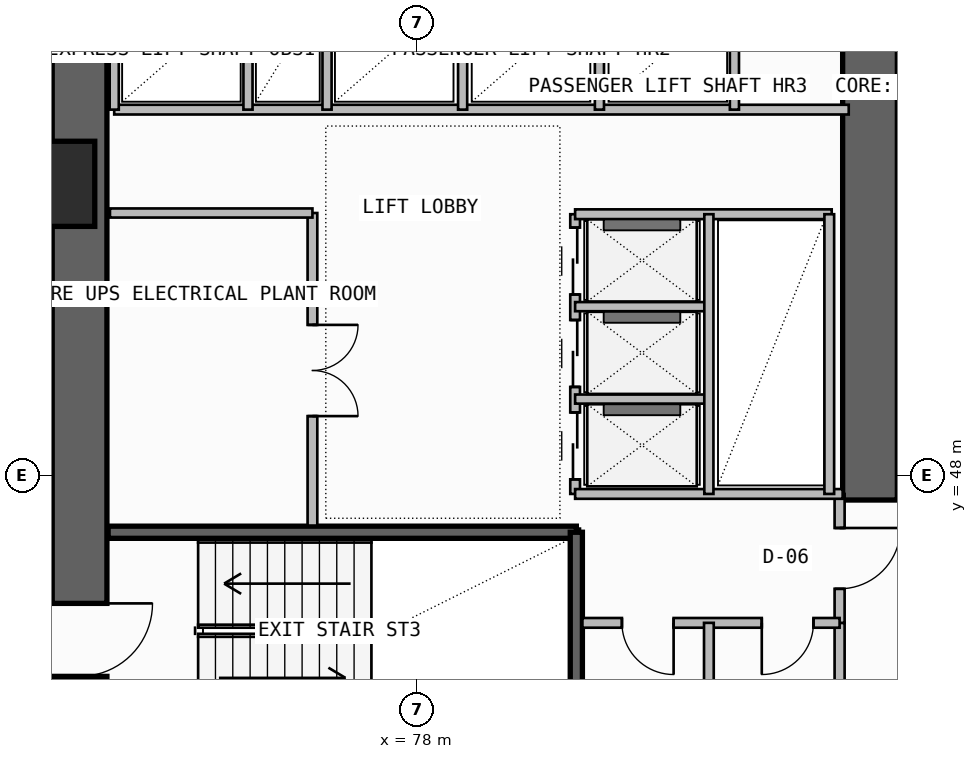
"""IFC4 building model, lengths in metres.
Left out: names, types, materials, properties, quantities, classifications, styles, units other than length and angle.
Written with IfcOpenShell. Run it as: python <this file> out.ifc"""

import sys

from ifc_helpers import new_model, si_unit, direction, frame, frame_2d, origin, origin_2d, place, context, subcontext, project, spatial, rectangle, extrude, element, fill, save


model = new_model("IFC4")
c1 = context("Model", 3, precision=1e-05, world=origin(), true_north=direction((0.0, 1.0)))
c2 = subcontext(c1, "Body", "Model", "MODEL_VIEW")
j1 = project(units=[si_unit("LENGTHUNIT", "METRE"), si_unit("PLANEANGLEUNIT", "RADIAN")], contexts=[c1])
p1 = place(None, origin())
s1 = spatial("IfcSite", under=j1, at=p1, CompositionType="ELEMENT")
p2 = place(p1, origin())
s2 = spatial("IfcBuilding", under=s1, at=p2, CompositionType="ELEMENT")
p3 = place(p2, frame((0.0, 0.0, 143.1)))
s3 = spatial("IfcBuildingStorey", under=s2, at=p3, CompositionType="ELEMENT", Elevation=143.1)
p4 = place(p3, frame((72.45, 43.35, -0.26), z_axis=(0.0, 0.0, 1.0), x_axis=(0.0, 1.0, 0.0)))
e1 = element("IfcWall", 1, at=p4, inside=s3, PredefinedType="SHEAR", context=c2, shape_type="SweptSolid", body=[
    extrude(rectangle(XDim=12.7, YDim=0.9, at=frame_2d((6.35, 0.0))), origin(), (0.0, 0.0, 1.0), 3.6),
])
p5 = place(p4, frame((1.35, 0.0, 0.26)))
e2 = element("IfcOpeningElement", 2, at=p5, cuts=e1, PredefinedType="OPENING", context=c2, shape_type="SweptSolid", body=[
    extrude(rectangle(XDim=1.2, YDim=2.2, at=frame_2d((0.6, 1.1))), frame((0.0, 0.46, 0.0), z_axis=(0.0, -1.0, 0.0), x_axis=(1.0, 0.0, 0.0)), (0.0, 0.0, 1.0), 0.92),
])
p6 = place(p3, frame((85.45, 47.6, -0.26), z_axis=(0.0, 0.0, 1.0), x_axis=(0.0, 1.0, 0.0)))
e3 = element("IfcWall", 3, at=p6, inside=s3, PredefinedType="SHEAR", context=c2, shape_type="SweptSolid", body=[
    extrude(rectangle(XDim=8.45, YDim=0.9, at=frame_2d((4.225, 0.0))), origin(), (0.0, 0.0, 1.0), 3.6),
])
p7 = place(p3, frame((72.0, 52.8, 0.0), z_axis=(0.0, 0.0, 1.0), x_axis=(1.0, 0.0, 0.0)))
e4 = element("IfcColumn", 4, at=p7, inside=s3, PredefinedType="COLUMN", context=c2, shape_type="SweptSolid", body=[
    extrude(rectangle(XDim=1.4, YDim=1.4, at=origin_2d()), origin(), (0.0, 0.0, 1.0), 3.6),
])
p8 = place(p3, frame((72.92, 47.07, -0.26), z_axis=(0.0, 0.0, 1.0), x_axis=(1.0, 0.0, 0.0)))
e5 = element("IfcWall", 5, at=p8, inside=s3, PredefinedType="SOLIDWALL", context=c2, shape_type="SweptSolid", body=[
    extrude(rectangle(XDim=7.7, YDim=0.2, at=frame_2d((3.85, 0.0))), origin(), (0.0, 0.0, 1.0), 3.6),
])
p9 = place(p3, frame((80.62, 43.83, -0.26), z_axis=(0.0, 0.0, 1.0), x_axis=(0.0, 1.0, 0.0)))
e6 = element("IfcWall", 6, at=p9, inside=s3, PredefinedType="SOLIDWALL", context=c2, shape_type="SweptSolid", body=[
    extrude(rectangle(XDim=3.24, YDim=0.2, at=frame_2d((1.62, 0.0))), origin(), (0.0, 0.0, 1.0), 3.6),
])
p10 = place(p3, frame((84.95, 43.68, 0.0), z_axis=(0.0, 0.0, 1.0), x_axis=(0.0, 1.0, 0.0)))
e7 = element("IfcWall", 7, at=p10, inside=s3, PredefinedType="PLUMBINGWALL", context=c2, shape_type="SweptSolid", body=[
    extrude(rectangle(XDim=1.9, YDim=0.165, at=frame_2d((0.95, 0.0))), origin(), (0.0, 0.0, 1.0), 3.34),
])
p11 = place(p3, frame((84.95, 45.58, 0.0), z_axis=(0.0, 0.0, 1.0), x_axis=(0.0, 1.0, 0.0)))
e8 = element("IfcWall", 8, at=p11, inside=s3, PredefinedType="PARTITIONING", context=c2, shape_type="SweptSolid", body=[
    extrude(rectangle(XDim=2.12, YDim=0.165, at=frame_2d((1.06, 0.0))), origin(), (0.0, 0.0, 1.0), 3.34),
])
p12 = place(p11, frame((0.56, 0.0, 0.0)))
e9 = element("IfcOpeningElement", 9, at=p12, cuts=e8, PredefinedType="OPENING", context=c2, shape_type="SweptSolid", body=[
    extrude(rectangle(XDim=1.0, YDim=2.2, at=frame_2d((0.5, 1.1))), frame((0.0, 0.093, 0.0), z_axis=(0.0, -1.0, 0.0), x_axis=(1.0, 0.0, 0.0)), (0.0, 0.0, 1.0), 0.185),
])
p13 = place(p3, frame((80.72, 45.58, 0.0), z_axis=(0.0, 0.0, 1.0), x_axis=(1.0, 0.0, 0.0)))
e10 = element("IfcWall", 10, at=p13, inside=s3, PredefinedType="PLUMBINGWALL", context=c2, shape_type="SweptSolid", body=[
    extrude(rectangle(XDim=4.23, YDim=0.16, at=frame_2d((2.115, 0.0))), origin(), (0.0, 0.0, 1.0), 3.34),
])
p14 = place(p13, frame((0.65, 0.0, 0.0)))
e11 = element("IfcOpeningElement", 11, at=p14, cuts=e10, PredefinedType="OPENING", context=c2, shape_type="SweptSolid", body=[
    extrude(rectangle(XDim=0.85, YDim=2.05, at=frame_2d((0.425, 1.025))), frame((0.0, 0.09, 0.0), z_axis=(0.0, -1.0, 0.0), x_axis=(1.0, 0.0, 0.0)), (0.0, 0.0, 1.0), 0.18),
])
p15 = place(p13, frame((2.95, 0.0, 0.0)))
e12 = element("IfcOpeningElement", 12, at=p15, cuts=e10, PredefinedType="OPENING", context=c2, shape_type="SweptSolid", body=[
    extrude(rectangle(XDim=0.85, YDim=2.05, at=frame_2d((0.425, 1.025))), frame((0.0, 0.09, 0.0), z_axis=(0.0, -1.0, 0.0), x_axis=(1.0, 0.0, 0.0)), (0.0, 0.0, 1.0), 0.18),
])
p16 = place(p3, frame((82.8, 43.68, 0.0), z_axis=(0.0, 0.0, 1.0), x_axis=(0.0, 1.0, 0.0)))
e13 = element("IfcWall", 13, at=p16, inside=s3, PredefinedType="PLUMBINGWALL", context=c2, shape_type="SweptSolid", body=[
    extrude(rectangle(XDim=1.9, YDim=0.16, at=frame_2d((0.95, 0.0))), origin(), (0.0, 0.0, 1.0), 3.34),
])
p17 = place(p3, frame((76.28, 47.18, 0.0), z_axis=(0.0, 0.0, 1.0), x_axis=(0.0, 1.0, 0.0)))
e14 = element("IfcWall", 14, at=p17, inside=s3, PredefinedType="SOLIDWALL", context=c2, shape_type="SweptSolid", body=[
    extrude(rectangle(XDim=5.14, YDim=0.16, at=frame_2d((2.57, 0.0))), origin(), (0.0, 0.0, 1.0), 3.34),
])
p18 = place(p17, frame((1.8, 0.0, 0.0)))
e15 = element("IfcOpeningElement", 15, at=p18, cuts=e14, PredefinedType="OPENING", context=c2, shape_type="SweptSolid", body=[
    extrude(rectangle(XDim=1.5, YDim=2.25, at=frame_2d((0.75, 1.125))), frame((0.0, 0.09, 0.0), z_axis=(0.0, -1.0, 0.0), x_axis=(1.0, 0.0, 0.0)), (0.0, 0.0, 1.0), 0.18),
])
p19 = place(p3, frame((72.95, 52.32, 0.0), z_axis=(0.0, 0.0, 1.0), x_axis=(1.0, 0.0, 0.0)))
e16 = element("IfcWall", 16, at=p19, inside=s3, PredefinedType="SOLIDWALL", context=c2, shape_type="SweptSolid", body=[
    extrude(rectangle(XDim=3.33, YDim=0.15, at=frame_2d((1.665, 0.0))), origin(), (0.0, 0.0, 1.0), 3.34),
])
p20 = place(p3, frame((80.6, 47.7, 0.0), z_axis=(0.0, 0.0, 1.0), x_axis=(0.0, 1.0, 0.0)))
e17 = element("IfcWall", 17, at=p20, inside=s3, PredefinedType="SOLIDWALL", context=c2, shape_type="SweptSolid", body=[
    extrude(rectangle(XDim=4.6, YDim=0.16, at=frame_2d((2.3, 0.0))), origin(), (0.0, 0.0, 1.0), 3.34),
])
p21 = place(p20, frame((0.24, 0.0, 0.0)))
e18 = element("IfcOpeningElement", 18, at=p21, cuts=e17, PredefinedType="OPENING", context=c2, shape_type="SweptSolid", body=[
    extrude(rectangle(XDim=1.1, YDim=2.25, at=frame_2d((0.55, 1.125))), frame((0.0, 0.09, 0.0), z_axis=(0.0, -1.0, 0.0), x_axis=(1.0, 0.0, 0.0)), (0.0, 0.0, 1.0), 0.18),
])
p22 = place(p20, frame((1.76, 0.0, 0.0)))
e19 = element("IfcOpeningElement", 19, at=p22, cuts=e17, PredefinedType="OPENING", context=c2, shape_type="SweptSolid", body=[
    extrude(rectangle(XDim=1.1, YDim=2.25, at=frame_2d((0.55, 1.125))), frame((0.0, 0.09, 0.0), z_axis=(0.0, -1.0, 0.0), x_axis=(1.0, 0.0, 0.0)), (0.0, 0.0, 1.0), 0.18),
])
p23 = place(p20, frame((3.28, 0.0, 0.0)))
e20 = element("IfcOpeningElement", 20, at=p23, cuts=e17, PredefinedType="OPENING", context=c2, shape_type="SweptSolid", body=[
    extrude(rectangle(XDim=1.1, YDim=2.25, at=frame_2d((0.55, 1.125))), frame((0.0, 0.09, 0.0), z_axis=(0.0, -1.0, 0.0), x_axis=(1.0, 0.0, 0.0)), (0.0, 0.0, 1.0), 0.18),
])
p24 = place(p3, frame((80.6, 47.7, 0.0), z_axis=(0.0, 0.0, 1.0), x_axis=(1.0, 0.0, 0.0)))
e21 = element("IfcWall", 21, at=p24, inside=s3, PredefinedType="SOLIDWALL", context=c2, shape_type="SweptSolid", body=[
    extrude(rectangle(XDim=4.4, YDim=0.16, at=frame_2d((2.2, 0.0))), origin(), (0.0, 0.0, 1.0), 3.34),
])
p25 = place(p3, frame((80.6, 52.3, 0.0), z_axis=(0.0, 0.0, 1.0), x_axis=(1.0, 0.0, 0.0)))
e22 = element("IfcWall", 22, at=p25, inside=s3, PredefinedType="SOLIDWALL", context=c2, shape_type="SweptSolid", body=[
    extrude(rectangle(XDim=4.22, YDim=0.16, at=frame_2d((2.11, 0.0))), origin(), (0.0, 0.0, 1.0), 3.34),
])
for number, where, z_axis, x_axis in (
    (23, (80.6, 49.26, 0.0), (0.0, 0.0, 1.0), (1.0, 0.0, 0.0)),
    (24, (80.6, 50.78, 0.0), (0.0, 0.0, 1.0), (1.0, 0.0, 0.0)),
):
    element("IfcWall", number, at=place(p3, frame(where, z_axis=z_axis, x_axis=x_axis)), inside=s3, PredefinedType="PLUMBINGWALL", context=c2, shape_type="SweptSolid", body=[
        extrude(rectangle(XDim=2.2, YDim=0.15, at=frame_2d((1.1, 0.0))), origin(), (0.0, 0.0, 1.0), 3.34),
    ])
p26 = place(p3, frame((82.8, 47.7, 0.0), z_axis=(0.0, 0.0, 1.0), x_axis=(0.0, 1.0, 0.0)))
e25 = element("IfcWall", 25, at=p26, inside=s3, PredefinedType="PLUMBINGWALL", context=c2, shape_type="SweptSolid", body=[
    extrude(rectangle(XDim=4.6, YDim=0.15, at=frame_2d((2.3, 0.0))), origin(), (0.0, 0.0, 1.0), 3.34),
])
p27 = place(p3, frame((84.78, 47.7, 0.0), z_axis=(0.0, 0.0, 1.0), x_axis=(0.0, 1.0, 0.0)))
e26 = element("IfcWall", 26, at=p27, inside=s3, PredefinedType="SOLIDWALL", context=c2, shape_type="SweptSolid", body=[
    extrude(rectangle(XDim=4.6, YDim=0.16, at=frame_2d((2.3, 0.0))), origin(), (0.0, 0.0, 1.0), 3.34),
])
p28 = place(p3, frame((73.02, 54.02, 0.0), z_axis=(0.0, 0.0, 1.0), x_axis=(1.0, 0.0, 0.0)))
e27 = element("IfcWall", 27, at=p28, inside=s3, PredefinedType="SOLIDWALL", context=c2, shape_type="SweptSolid", body=[
    extrude(rectangle(XDim=12.08, YDim=0.16, at=frame_2d((6.04, 0.0))), origin(), (0.0, 0.0, 1.0), 3.34),
])
p29 = place(p3, frame((73.02, 54.02, 0.0), z_axis=(0.0, 0.0, 1.0), x_axis=(0.0, 1.0, 0.0)))
e28 = element("IfcWall", 28, at=p29, inside=s3, PredefinedType="PLUMBINGWALL", context=c2, shape_type="SweptSolid", body=[
    extrude(rectangle(XDim=1.94, YDim=0.15, at=frame_2d((0.97, 0.0))), origin(), (0.0, 0.0, 1.0), 3.34),
])
p30 = place(p3, frame((76.52, 54.02, 0.0), z_axis=(0.0, 0.0, 1.0), x_axis=(0.0, 1.0, 0.0)))
e29 = element("IfcWall", 29, at=p30, inside=s3, PredefinedType="SOLIDWALL", context=c2, shape_type="SweptSolid", body=[
    extrude(rectangle(XDim=1.94, YDim=0.15, at=frame_2d((0.97, 0.0))), origin(), (0.0, 0.0, 1.0), 3.34),
])
p31 = place(p3, frame((75.22, 54.02, 0.0), z_axis=(0.0, 0.0, 1.0), x_axis=(0.0, 1.0, 0.0)))
e30 = element("IfcWall", 30, at=p31, inside=s3, PredefinedType="PLUMBINGWALL", context=c2, shape_type="SweptSolid", body=[
    extrude(rectangle(XDim=1.94, YDim=0.15, at=frame_2d((0.97, 0.0))), origin(), (0.0, 0.0, 1.0), 3.34),
])
for number, where, z_axis, x_axis in (
    (31, (78.75, 54.02, 0.0), (0.0, 0.0, 1.0), (0.0, 1.0, 0.0)),
    (32, (81.0, 54.02, 0.0), (0.0, 0.0, 1.0), (0.0, 1.0, 0.0)),
):
    element("IfcWall", number, at=place(p3, frame(where, z_axis=z_axis, x_axis=x_axis)), inside=s3, PredefinedType="PLUMBINGWALL", context=c2, shape_type="SweptSolid", body=[
        extrude(rectangle(XDim=1.96, YDim=0.15, at=frame_2d((0.98, 0.0))), origin(), (0.0, 0.0, 1.0), 3.34),
    ])
p32 = place(p3, frame((83.22, 54.02, 0.0), z_axis=(0.0, 0.0, 1.0), x_axis=(0.0, 1.0, 0.0)))
e33 = element("IfcWall", 33, at=p32, inside=s3, PredefinedType="SOLIDWALL", context=c2, shape_type="SweptSolid", body=[
    extrude(rectangle(XDim=1.96, YDim=0.15, at=frame_2d((0.98, 0.0))), origin(), (0.0, 0.0, 1.0), 3.34),
])
p33 = place(p5, frame((1.2, 0.0, 0.0), z_axis=(0.0, 0.0, 1.0), x_axis=(-1.0, 0.0, 0.0)))
e34 = element("IfcDoor", 34, at=p33, inside=s3, OperationType="SINGLE_SWING_LEFT", PredefinedType="USERDEFINED", context=c2, shape_type="SweptSolid", body=[
    extrude(rectangle(XDim=1.2, YDim=2.2, at=frame_2d((0.6, 1.1))), frame((0.0, 0.025, 0.0), z_axis=(0.0, -1.0, 0.0), x_axis=(1.0, 0.0, 0.0)), (0.0, 0.0, 1.0), 0.05),
])
fill(e2, e34)
p34 = place(p12, frame((1.0, 0.0, 0.0), z_axis=(0.0, 0.0, 1.0), x_axis=(-1.0, 0.0, 0.0)))
e35 = element("IfcDoor", 35, at=p34, inside=s3, OperationType="SINGLE_SWING_LEFT", PredefinedType="DOOR", context=c2, shape_type="SweptSolid", body=[
    extrude(rectangle(XDim=1.0, YDim=2.2, at=frame_2d((0.5, 1.1))), frame((0.0, 0.025, 0.0), z_axis=(0.0, -1.0, 0.0), x_axis=(1.0, 0.0, 0.0)), (0.0, 0.0, 1.0), 0.05),
])
fill(e9, e35)
p35 = place(p14, frame((0.85, 0.0, 0.0), z_axis=(0.0, 0.0, 1.0), x_axis=(-1.0, 0.0, 0.0)))
e36 = element("IfcDoor", 36, at=p35, inside=s3, OperationType="SINGLE_SWING_LEFT", PredefinedType="DOOR", context=c2, shape_type="SweptSolid", body=[
    extrude(rectangle(XDim=0.85, YDim=2.05, at=frame_2d((0.425, 1.025))), frame((0.0, 0.025, 0.0), z_axis=(0.0, -1.0, 0.0), x_axis=(1.0, 0.0, 0.0)), (0.0, 0.0, 1.0), 0.05),
])
fill(e11, e36)
p36 = place(p15, frame((0.85, 0.0, 0.0), z_axis=(0.0, 0.0, 1.0), x_axis=(-1.0, 0.0, 0.0)))
e37 = element("IfcDoor", 37, at=p36, inside=s3, OperationType="SINGLE_SWING_RIGHT", PredefinedType="DOOR", context=c2, shape_type="SweptSolid", body=[
    extrude(rectangle(XDim=0.85, YDim=2.05, at=frame_2d((0.425, 1.025))), frame((0.0, 0.025, 0.0), z_axis=(0.0, -1.0, 0.0), x_axis=(1.0, 0.0, 0.0)), (0.0, 0.0, 1.0), 0.05),
])
fill(e12, e37)
p37 = place(p18, frame((1.5, 0.0, 0.0), z_axis=(0.0, 0.0, 1.0), x_axis=(-1.0, 0.0, 0.0)))
e38 = element("IfcDoor", 38, at=p37, inside=s3, OperationType="DOUBLE_DOOR_SINGLE_SWING", PredefinedType="DOOR", context=c2, shape_type="SweptSolid", body=[
    extrude(rectangle(XDim=1.5, YDim=2.25, at=frame_2d((0.75, 1.125))), frame((0.0, 0.025, 0.0), z_axis=(0.0, -1.0, 0.0), x_axis=(1.0, 0.0, 0.0)), (0.0, 0.0, 1.0), 0.05),
])
fill(e15, e38)
p38 = place(p21, frame((1.1, 0.0, 0.0), z_axis=(0.0, 0.0, 1.0), x_axis=(-1.0, 0.0, 0.0)))
e39 = element("IfcDoor", 39, at=p38, inside=s3, OperationType="DOUBLE_DOOR_SLIDING", PredefinedType="DOOR", context=c2, shape_type="SweptSolid", body=[
    extrude(rectangle(XDim=1.1, YDim=2.25, at=frame_2d((0.55, 1.125))), frame((0.0, 0.025, 0.0), z_axis=(0.0, -1.0, 0.0), x_axis=(1.0, 0.0, 0.0)), (0.0, 0.0, 1.0), 0.05),
])
fill(e18, e39)
p39 = place(p22, frame((1.1, 0.0, 0.0), z_axis=(0.0, 0.0, 1.0), x_axis=(-1.0, 0.0, 0.0)))
e40 = element("IfcDoor", 40, at=p39, inside=s3, OperationType="DOUBLE_DOOR_SLIDING", PredefinedType="DOOR", context=c2, shape_type="SweptSolid", body=[
    extrude(rectangle(XDim=1.1, YDim=2.25, at=frame_2d((0.55, 1.125))), frame((0.0, 0.025, 0.0), z_axis=(0.0, -1.0, 0.0), x_axis=(1.0, 0.0, 0.0)), (0.0, 0.0, 1.0), 0.05),
])
fill(e19, e40)
p40 = place(p23, frame((1.1, 0.0, 0.0), z_axis=(0.0, 0.0, 1.0), x_axis=(-1.0, 0.0, 0.0)))
e41 = element("IfcDoor", 41, at=p40, inside=s3, OperationType="DOUBLE_DOOR_SLIDING", PredefinedType="DOOR", context=c2, shape_type="SweptSolid", body=[
    extrude(rectangle(XDim=1.1, YDim=2.25, at=frame_2d((0.55, 1.125))), frame((0.0, 0.025, 0.0), z_axis=(0.0, -1.0, 0.0), x_axis=(1.0, 0.0, 0.0)), (0.0, 0.0, 1.0), 0.05),
])
fill(e20, e41)
save(model, sys.argv[1])
